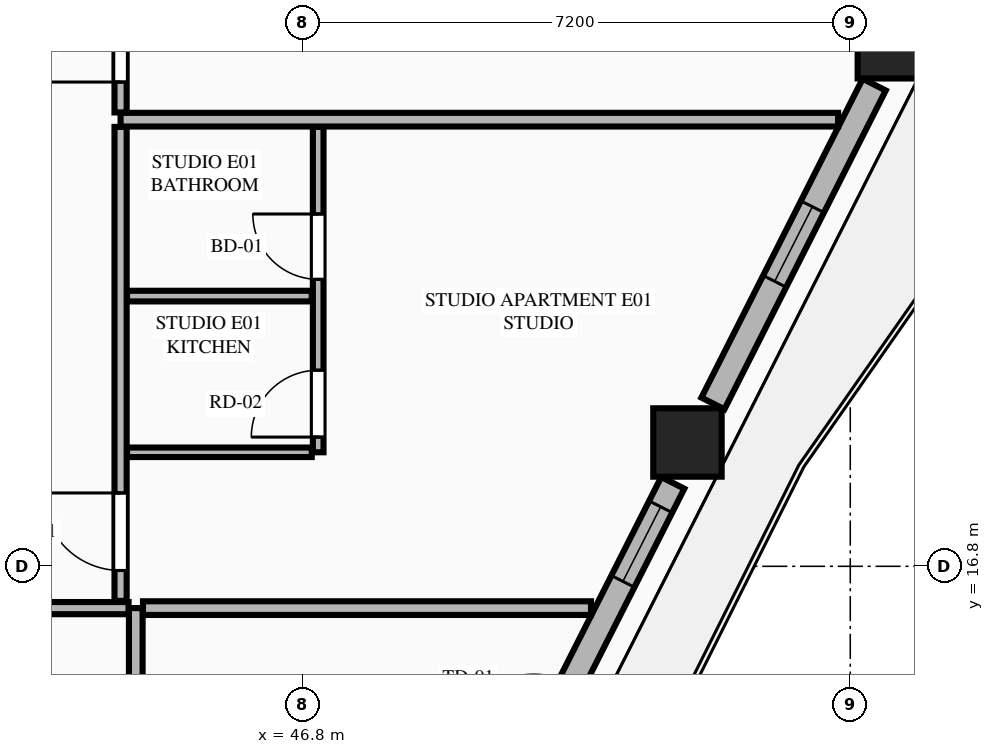
"""IFC4 building model, lengths in metres.
Left out: names, types, materials, properties, quantities, classifications, styles, units other than length and angle.
Written with IfcOpenShell. Run it as: python <this file> out.ifc"""

import sys

from ifc_helpers import new_model, si_unit, direction, frame, frame_2d, origin, origin_2d, place, context, subcontext, project, spatial, rectangle, extrude, element, fill, save


model = new_model("IFC4")
c1 = context("Model", 3, precision=1e-05, world=origin(), true_north=direction((0.0, 1.0)))
c2 = subcontext(c1, "Body", "Model", "MODEL_VIEW")
j1 = project(units=[si_unit("LENGTHUNIT", "METRE"), si_unit("PLANEANGLEUNIT", "RADIAN")], contexts=[c1])
p1 = place(None, origin())
s1 = spatial("IfcSite", under=j1, at=p1, CompositionType="ELEMENT")
p2 = place(p1, origin())
s2 = spatial("IfcBuilding", under=s1, at=p2, CompositionType="ELEMENT")
p3 = place(p2, frame((0.0, 0.0, 189.65)))
s3 = spatial("IfcBuildingStorey", under=s2, at=p3, CompositionType="ELEMENT", Elevation=189.65)
for number, where, z_axis, x_axis in (
    (1, (51.858, 18.429, 0.0), (0.0, 0.0, 1.0), (1.0, 0.0, 0.0)),
    (2, (54.547, 23.668, 0.0), (0.0, 0.0, 1.0), (1.0, 0.0, 0.0)),
):
    element("IfcColumn", number, at=place(p3, frame(where, z_axis=z_axis, x_axis=x_axis)), inside=s3, PredefinedType="COLUMN", context=c2, shape_type="SweptSolid", body=[
        extrude(rectangle(XDim=0.9, YDim=0.9, at=origin_2d()), origin(), (0.0, 0.0, 1.0), 3.55),
    ])
p4 = place(p3, frame((49.448, 13.517, 0.0), z_axis=(0.0, 0.0, 1.0), x_axis=(0.451544279509, 0.892248711763, 0.0)))
e3 = element("IfcWall", 3, at=p4, inside=s3, PredefinedType="STANDARD", context=c2, shape_type="SweptSolid", body=[
    extrude(rectangle(XDim=4.91, YDim=0.34, at=frame_2d((2.455, 0.0))), origin(), (0.0, 0.0, 1.0), 2.883),
])
p5 = place(p4, frame((0.856, 0.0, 0.0)))
e4 = element("IfcOpeningElement", 4, at=p5, cuts=e3, PredefinedType="OPENING", context=c2, shape_type="SweptSolid", body=[
    extrude(rectangle(XDim=1.1, YDim=2.25, at=frame_2d((0.55, 1.125))), frame((0.0, 0.18, 0.0), z_axis=(0.0, -1.0, 0.0), x_axis=(1.0, 0.0, 0.0)), (0.0, 0.0, 1.0), 0.36),
])
p6 = place(p4, frame((3.457, 0.0, 0.75)))
e5 = element("IfcOpeningElement", 5, at=p6, cuts=e3, PredefinedType="OPENING", context=c2, shape_type="SweptSolid", body=[
    extrude(rectangle(XDim=1.1, YDim=1.983, at=frame_2d((0.55, 0.991))), frame((0.0, 0.18, 0.0), z_axis=(0.0, -1.0, 0.0), x_axis=(1.0, 0.0, 0.0)), (0.0, 0.0, 1.0), 0.36),
])
p7 = place(p3, frame((52.193, 18.943, 0.0), z_axis=(0.0, 0.0, 1.0), x_axis=(0.451447222193, 0.892297823361, 0.0)))
e6 = element("IfcWall", 6, at=p7, inside=s3, PredefinedType="STANDARD", context=c2, shape_type="SweptSolid", body=[
    extrude(rectangle(XDim=4.7, YDim=0.34, at=frame_2d((2.35, 0.0))), origin(), (0.0, 0.0, 1.0), 2.883),
])
p8 = place(p7, frame((1.8, 0.0, 0.75)))
e7 = element("IfcOpeningElement", 7, at=p8, cuts=e6, PredefinedType="OPENING", context=c2, shape_type="SweptSolid", body=[
    extrude(rectangle(XDim=1.1, YDim=1.983, at=frame_2d((0.55, 0.991))), frame((0.0, 0.18, 0.0), z_axis=(0.0, -1.0, 0.0), x_axis=(1.0, 0.0, 0.0)), (0.0, 0.0, 1.0), 0.36),
])
p9 = place(p3, frame((44.6, 5.968, 0.0), z_axis=(0.0, 0.0, 1.0), x_axis=(0.0, 1.0, 0.0)))
e8 = element("IfcWall", 8, at=p9, inside=s3, PredefinedType="PARTITIONING", context=c2, shape_type="SweptSolid", body=[
    extrude(rectangle(XDim=10.282, YDim=0.18, at=frame_2d((5.141, 0.0))), origin(), (0.0, 0.0, 1.0), 3.35),
])
p10 = place(p3, frame((36.038, 16.25, 0.0), z_axis=(0.0, 0.0, 1.0), x_axis=(1.0, 0.0, 0.0)))
e9 = element("IfcWall", 9, at=p10, inside=s3, PredefinedType="PARTITIONING", context=c2, shape_type="SweptSolid", body=[
    extrude(rectangle(XDim=8.467, YDim=0.16, at=frame_2d((4.233, 0.0))), origin(), (0.0, 0.0, 1.0), 3.35),
])
p11 = place(p10, frame((0.355, 0.0, 0.0)))
e10 = element("IfcOpeningElement", 10, at=p11, cuts=e9, PredefinedType="OPENING", context=c2, shape_type="SweptSolid", body=[
    extrude(rectangle(XDim=1.02, YDim=2.25, at=frame_2d((0.51, 1.125))), frame((0.0, 0.09, 0.0), z_axis=(0.0, -1.0, 0.0), x_axis=(1.0, 0.0, 0.0)), (0.0, 0.0, 1.0), 0.18),
])
p12 = place(p3, frame((44.695, 16.25, 0.0), z_axis=(0.0, 0.0, 1.0), x_axis=(1.0, 0.0, 0.0)))
e11 = element("IfcWall", 11, at=p12, inside=s3, PredefinedType="PARTITIONING", context=c2, shape_type="SweptSolid", body=[
    extrude(rectangle(XDim=5.894, YDim=0.18, at=frame_2d((2.947, 0.0))), origin(), (0.0, 0.0, 1.0), 3.35),
])
p13 = place(p3, frame((44.4, 16.345, 0.0), z_axis=(0.0, 0.0, 1.0), x_axis=(0.0, 1.0, 0.0)))
e12 = element("IfcWall", 12, at=p13, inside=s3, PredefinedType="PARTITIONING", context=c2, shape_type="SweptSolid", body=[
    extrude(rectangle(XDim=6.236, YDim=0.16, at=frame_2d((3.118, 0.0))), origin(), (0.0, 0.0, 1.0), 3.35),
])
p14 = place(p13, frame((0.4, 0.0, 0.0)))
e13 = element("IfcOpeningElement", 13, at=p14, cuts=e12, PredefinedType="OPENING", context=c2, shape_type="SweptSolid", body=[
    extrude(rectangle(XDim=1.02, YDim=2.25, at=frame_2d((0.51, 1.125))), frame((0.0, 0.09, 0.0), z_axis=(0.0, -1.0, 0.0), x_axis=(1.0, 0.0, 0.0)), (0.0, 0.0, 1.0), 0.18),
])
p15 = place(p3, frame((44.485, 18.3, 0.0), z_axis=(0.0, 0.0, 1.0), x_axis=(1.0, 0.0, 0.0)))
e14 = element("IfcWall", 14, at=p15, inside=s3, PredefinedType="PARTITIONING", context=c2, shape_type="SweptSolid", body=[
    extrude(rectangle(XDim=2.43, YDim=0.125, at=frame_2d((1.215, 0.0))), origin(), (0.0, 0.0, 1.0), 2.807),
])
p16 = place(p3, frame((47.0, 18.3, 0.0), z_axis=(0.0, 0.0, 1.0), x_axis=(0.0, 1.0, 0.0)))
e15 = element("IfcWall", 15, at=p16, inside=s3, PredefinedType="PLUMBINGWALL", context=c2, shape_type="SweptSolid", body=[
    extrude(rectangle(XDim=4.281, YDim=0.14, at=frame_2d((2.141, 0.0))), origin(), (0.0, 0.0, 1.0), 3.35),
])
p17 = place(p16, frame((2.275, 0.0, 0.0)))
e16 = element("IfcOpeningElement", 16, at=p17, cuts=e15, PredefinedType="OPENING", context=c2, shape_type="SweptSolid", body=[
    extrude(rectangle(XDim=0.86, YDim=2.1, at=frame_2d((0.43, 1.05))), frame((0.0, 0.08, 0.0), z_axis=(0.0, -1.0, 0.0), x_axis=(1.0, 0.0, 0.0)), (0.0, 0.0, 1.0), 0.16),
])
p18 = place(p16, frame((0.2, 0.0, 0.0)))
e17 = element("IfcOpeningElement", 17, at=p18, cuts=e15, PredefinedType="OPENING", context=c2, shape_type="SweptSolid", body=[
    extrude(rectangle(XDim=0.88, YDim=2.15, at=frame_2d((0.44, 1.075))), frame((0.0, 0.08, 0.0), z_axis=(0.0, -1.0, 0.0), x_axis=(1.0, 0.0, 0.0)), (0.0, 0.0, 1.0), 0.16),
])
p19 = place(p3, frame((44.485, 20.355, 0.0), z_axis=(0.0, 0.0, 1.0), x_axis=(1.0, 0.0, 0.0)))
e18 = element("IfcWall", 18, at=p19, inside=s3, PredefinedType="PLUMBINGWALL", context=c2, shape_type="SweptSolid", body=[
    extrude(rectangle(XDim=2.43, YDim=0.14, at=frame_2d((1.215, 0.0))), origin(), (0.0, 0.0, 1.0), 3.35),
])
p20 = place(p3, frame((44.4, 22.676, 0.0), z_axis=(0.0, 0.0, 1.0), x_axis=(1.0, 0.0, 0.0)))
e19 = element("IfcWall", 19, at=p20, inside=s3, PredefinedType="PARTITIONING", context=c2, shape_type="SweptSolid", body=[
    extrude(rectangle(XDim=9.44, YDim=0.18, at=frame_2d((4.72, 0.0))), origin(), (0.0, 0.0, 1.0), 3.35),
])
p21 = place(p3, frame((44.4, 22.771, 0.0), z_axis=(0.0, 0.0, 1.0), x_axis=(0.0, 1.0, 0.0)))
e20 = element("IfcWall", 20, at=p21, inside=s3, PredefinedType="PARTITIONING", context=c2, shape_type="SweptSolid", body=[
    extrude(rectangle(XDim=6.236, YDim=0.16, at=frame_2d((3.118, 0.0))), origin(), (0.0, 0.0, 1.0), 3.35),
])
p22 = place(p21, frame((0.4, 0.0, 0.0)))
e21 = element("IfcOpeningElement", 21, at=p22, cuts=e20, PredefinedType="OPENING", context=c2, shape_type="SweptSolid", body=[
    extrude(rectangle(XDim=1.02, YDim=2.25, at=frame_2d((0.51, 1.125))), frame((0.0, 0.09, 0.0), z_axis=(0.0, -1.0, 0.0), x_axis=(1.0, 0.0, 0.0)), (0.0, 0.0, 1.0), 0.18),
])
p23 = place(p8, origin())
e22 = element("IfcWindow", 22, at=p23, inside=s3, PartitioningType="SINGLE_PANEL", PredefinedType="WINDOW", context=c2, shape_type="SweptSolid", body=[
    extrude(rectangle(XDim=1.1, YDim=1.983, at=frame_2d((0.55, 0.991))), frame((0.0, 0.03, 0.0), z_axis=(0.0, -1.0, 0.0), x_axis=(1.0, 0.0, 0.0)), (0.0, 0.0, 1.0), 0.06),
])
fill(e7, e22)
p24 = place(p17, origin())
e23 = element("IfcDoor", 23, at=p24, inside=s3, OperationType="SINGLE_SWING_RIGHT", PredefinedType="DOOR", context=c2, shape_type="SweptSolid", body=[
    extrude(rectangle(XDim=0.86, YDim=2.1, at=frame_2d((0.43, 1.05))), frame((0.0, 0.025, 0.0), z_axis=(0.0, -1.0, 0.0), x_axis=(1.0, 0.0, 0.0)), (0.0, 0.0, 1.0), 0.05),
])
fill(e16, e23)
p25 = place(p14, origin())
e24 = element("IfcDoor", 24, at=p25, inside=s3, OperationType="SINGLE_SWING_RIGHT", PredefinedType="DOOR", context=c2, shape_type="SweptSolid", body=[
    extrude(rectangle(XDim=1.02, YDim=2.25, at=frame_2d((0.51, 1.125))), frame((0.0, 0.025, 0.0), z_axis=(0.0, -1.0, 0.0), x_axis=(1.0, 0.0, 0.0)), (0.0, 0.0, 1.0), 0.05),
])
fill(e13, e24)
p26 = place(p18, origin())
e25 = element("IfcDoor", 25, at=p26, inside=s3, OperationType="SINGLE_SWING_LEFT", PredefinedType="DOOR", context=c2, shape_type="SweptSolid", body=[
    extrude(rectangle(XDim=0.88, YDim=2.15, at=frame_2d((0.44, 1.075))), frame((0.0, 0.025, 0.0), z_axis=(0.0, -1.0, 0.0), x_axis=(1.0, 0.0, 0.0)), (0.0, 0.0, 1.0), 0.05),
])
fill(e17, e25)
p27 = place(p22, origin())
e26 = element("IfcDoor", 26, at=p27, inside=s3, OperationType="SINGLE_SWING_LEFT", PredefinedType="DOOR", context=c2, shape_type="SweptSolid", body=[
    extrude(rectangle(XDim=1.02, YDim=2.25, at=frame_2d((0.51, 1.125))), frame((0.0, 0.025, 0.0), z_axis=(0.0, -1.0, 0.0), x_axis=(1.0, 0.0, 0.0)), (0.0, 0.0, 1.0), 0.05),
])
fill(e21, e26)
p28 = place(p6, origin())
e27 = element("IfcWindow", 27, at=p28, inside=s3, PartitioningType="SINGLE_PANEL", PredefinedType="WINDOW", context=c2, shape_type="SweptSolid", body=[
    extrude(rectangle(XDim=1.1, YDim=1.983, at=frame_2d((0.55, 0.991))), frame((0.0, 0.03, 0.0), z_axis=(0.0, -1.0, 0.0), x_axis=(1.0, 0.0, 0.0)), (0.0, 0.0, 1.0), 0.06),
])
fill(e5, e27)
save(model, sys.argv[1])
